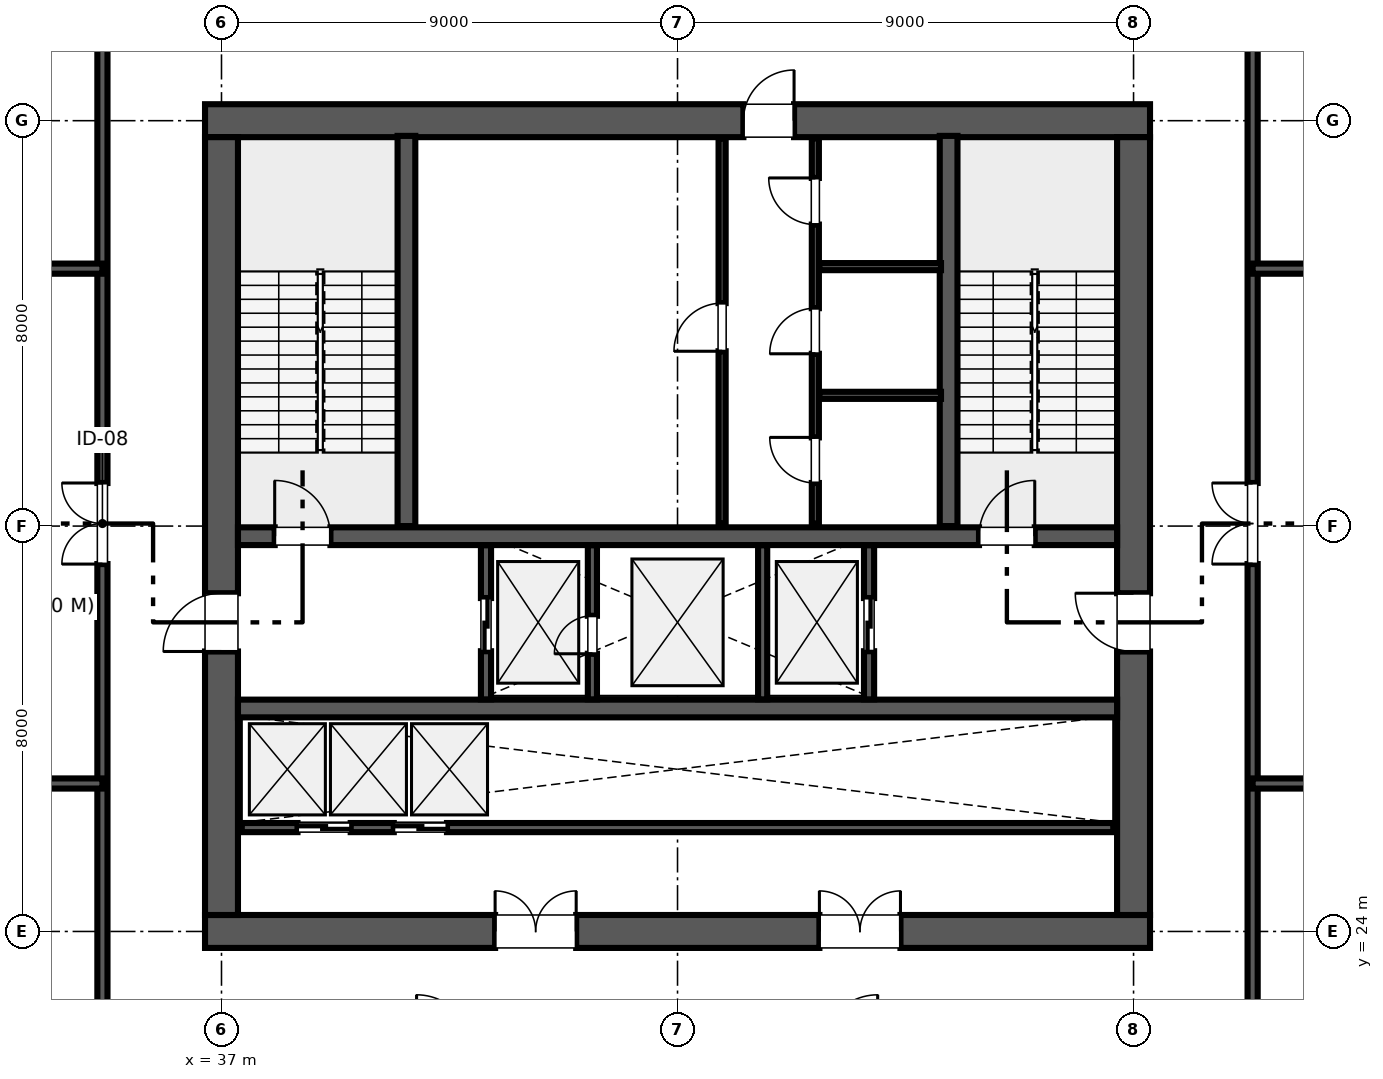
"""IFC4 building model, lengths in metres.
Left out: names, types, materials, properties, quantities, classifications, styles, units other than length and angle.
Written with IfcOpenShell. Run it as: python <this file> out.ifc"""

import sys

from ifc_helpers import new_model, si_unit, direction, frame, frame_2d, origin, place, context, subcontext, project, spatial, rectangle, extrude, element, fill, save


model = new_model("IFC4")
c1 = context("Model", 3, precision=1e-05, world=origin(), true_north=direction((0.0, 1.0)))
c2 = subcontext(c1, "Body", "Model", "MODEL_VIEW")
j1 = project(units=[si_unit("LENGTHUNIT", "METRE"), si_unit("PLANEANGLEUNIT", "RADIAN")], contexts=[c1])
p1 = place(None, origin())
s1 = spatial("IfcSite", under=j1, at=p1, CompositionType="ELEMENT")
p2 = place(p1, origin())
s2 = spatial("IfcBuilding", under=s1, at=p2, CompositionType="ELEMENT")
p3 = place(p2, frame((0.0, 0.0, 85.6)))
s3 = spatial("IfcBuildingStorey", under=s2, at=p3, CompositionType="ELEMENT", Elevation=85.6)
p4 = place(p3, frame((36.675, 24.0, 0.0), z_axis=(0.0, 0.0, 1.0), x_axis=(1.0, 0.0, 0.0)))
e1 = element("IfcWall", 1, at=p4, inside=s3, PredefinedType="SHEAR", context=c2, shape_type="SweptSolid", body=[
    extrude(rectangle(XDim=18.65, YDim=0.65, at=frame_2d((9.325, 0.0))), origin(), (0.0, 0.0, 1.0), 4.48),
])
p5 = place(p4, frame((5.725, 0.0, 0.0)))
e2 = element("IfcOpeningElement", 2, at=p5, cuts=e1, PredefinedType="OPENING", context=c2, shape_type="SweptSolid", body=[
    extrude(rectangle(XDim=1.6, YDim=2.15, at=frame_2d((0.8, 1.075))), frame((0.0, 0.335, 0.0), z_axis=(0.0, -1.0, 0.0), x_axis=(1.0, 0.0, 0.0)), (0.0, 0.0, 1.0), 0.67),
])
p6 = place(p4, frame((12.125, 0.0, 0.0)))
e3 = element("IfcOpeningElement", 3, at=p6, cuts=e1, PredefinedType="OPENING", context=c2, shape_type="SweptSolid", body=[
    extrude(rectangle(XDim=1.6, YDim=2.15, at=frame_2d((0.8, 1.075))), frame((0.0, 0.335, 0.0), z_axis=(0.0, -1.0, 0.0), x_axis=(1.0, 0.0, 0.0)), (0.0, 0.0, 1.0), 0.67),
])
p7 = place(p3, frame((36.675, 40.0, 0.0), z_axis=(0.0, 0.0, 1.0), x_axis=(1.0, 0.0, 0.0)))
e4 = element("IfcWall", 4, at=p7, inside=s3, PredefinedType="SHEAR", context=c2, shape_type="SweptSolid", body=[
    extrude(rectangle(XDim=18.65, YDim=0.65, at=frame_2d((9.325, 0.0))), origin(), (0.0, 0.0, 1.0), 4.48),
])
p8 = place(p7, frame((10.625, 0.0, 0.0)))
e5 = element("IfcOpeningElement", 5, at=p8, cuts=e4, PredefinedType="OPENING", context=c2, shape_type="SweptSolid", body=[
    extrude(rectangle(XDim=1.0, YDim=2.15, at=frame_2d((0.5, 1.075))), frame((0.0, 0.335, 0.0), z_axis=(0.0, -1.0, 0.0), x_axis=(1.0, 0.0, 0.0)), (0.0, 0.0, 1.0), 0.67),
])
p9 = place(p3, frame((37.0, 24.325, 0.0), z_axis=(0.0, 0.0, 1.0), x_axis=(0.0, 1.0, 0.0)))
e6 = element("IfcWall", 6, at=p9, inside=s3, PredefinedType="SHEAR", context=c2, shape_type="SweptSolid", body=[
    extrude(rectangle(XDim=15.35, YDim=0.65, at=frame_2d((7.675, 0.0))), origin(), (0.0, 0.0, 1.0), 4.48),
])
p10 = place(p9, frame((5.2, 0.0, 0.0)))
e7 = element("IfcOpeningElement", 7, at=p10, cuts=e6, PredefinedType="OPENING", context=c2, shape_type="SweptSolid", body=[
    extrude(rectangle(XDim=1.15, YDim=2.15, at=frame_2d((0.575, 1.075))), frame((0.0, 0.335, 0.0), z_axis=(0.0, -1.0, 0.0), x_axis=(1.0, 0.0, 0.0)), (0.0, 0.0, 1.0), 0.67),
])
p11 = place(p3, frame((55.0, 24.325, 0.0), z_axis=(0.0, 0.0, 1.0), x_axis=(0.0, 1.0, 0.0)))
e8 = element("IfcWall", 8, at=p11, inside=s3, PredefinedType="SHEAR", context=c2, shape_type="SweptSolid", body=[
    extrude(rectangle(XDim=15.35, YDim=0.65, at=frame_2d((7.675, 0.0))), origin(), (0.0, 0.0, 1.0), 4.48),
])
p12 = place(p11, frame((5.2, 0.0, 0.0)))
e9 = element("IfcOpeningElement", 9, at=p12, cuts=e8, PredefinedType="OPENING", context=c2, shape_type="SweptSolid", body=[
    extrude(rectangle(XDim=1.15, YDim=2.15, at=frame_2d((0.575, 1.075))), frame((0.0, 0.335, 0.0), z_axis=(0.0, -1.0, 0.0), x_axis=(1.0, 0.0, 0.0)), (0.0, 0.0, 1.0), 0.67),
])
p13 = place(p3, frame((37.325, 31.8, 0.0), z_axis=(0.0, 0.0, 1.0), x_axis=(1.0, 0.0, 0.0)))
e10 = element("IfcWall", 10, at=p13, inside=s3, PredefinedType="SHEAR", context=c2, shape_type="SweptSolid", body=[
    extrude(rectangle(XDim=17.35, YDim=0.35, at=frame_2d((8.675, 0.0))), origin(), (0.0, 0.0, 1.0), 4.48),
])
p14 = place(p13, frame((0.725, 0.0, 0.0)))
e11 = element("IfcOpeningElement", 11, at=p14, cuts=e10, PredefinedType="OPENING", context=c2, shape_type="SweptSolid", body=[
    extrude(rectangle(XDim=1.1, YDim=2.15, at=frame_2d((0.55, 1.075))), frame((0.0, 0.185, 0.0), z_axis=(0.0, -1.0, 0.0), x_axis=(1.0, 0.0, 0.0)), (0.0, 0.0, 1.0), 0.37),
])
p15 = place(p13, frame((14.625, 0.0, 0.0)))
e12 = element("IfcOpeningElement", 12, at=p15, cuts=e10, PredefinedType="OPENING", context=c2, shape_type="SweptSolid", body=[
    extrude(rectangle(XDim=1.1, YDim=2.15, at=frame_2d((0.55, 1.075))), frame((0.0, 0.185, 0.0), z_axis=(0.0, -1.0, 0.0), x_axis=(1.0, 0.0, 0.0)), (0.0, 0.0, 1.0), 0.37),
])
p16 = place(p3, frame((37.325, 28.4, 0.0), z_axis=(0.0, 0.0, 1.0), x_axis=(1.0, 0.0, 0.0)))
e13 = element("IfcWall", 13, at=p16, inside=s3, PredefinedType="SHEAR", context=c2, shape_type="SweptSolid", body=[
    extrude(rectangle(XDim=17.35, YDim=0.35, at=frame_2d((8.675, 0.0))), origin(), (0.0, 0.0, 1.0), 4.48),
])
for number, where, z_axis, x_axis in (
    (14, (40.65, 32.0, 0.0), (0.0, 0.0, 1.0), (0.0, 1.0, 0.0)),
    (15, (51.35, 32.0, 0.0), (0.0, 0.0, 1.0), (0.0, 1.0, 0.0)),
):
    element("IfcWall", number, at=place(p3, frame(where, z_axis=z_axis, x_axis=x_axis)), inside=s3, PredefinedType="SHEAR", context=c2, shape_type="SweptSolid", body=[
        extrude(rectangle(XDim=7.7, YDim=0.35, at=frame_2d((3.85, 0.0))), origin(), (0.0, 0.0, 1.0), 4.8),
    ])
p17 = place(p3, frame((46.88, 32.05, 0.0), z_axis=(0.0, 0.0, 1.0), x_axis=(0.0, 1.0, 0.0)))
e16 = element("IfcWall", 16, at=p17, inside=s3, PredefinedType="PARTITIONING", context=c2, shape_type="SweptSolid", body=[
    extrude(rectangle(XDim=7.6, YDim=0.14, at=frame_2d((3.8, 0.0))), origin(), (0.0, 0.0, 1.0), 4.48),
])
p18 = place(p17, frame((3.4, 0.0, 0.0)))
e17 = element("IfcOpeningElement", 17, at=p18, cuts=e16, PredefinedType="OPENING", context=c2, shape_type="SweptSolid", body=[
    extrude(rectangle(XDim=0.95, YDim=2.15, at=frame_2d((0.475, 1.075))), frame((0.0, 0.08, 0.0), z_axis=(0.0, -1.0, 0.0), x_axis=(1.0, 0.0, 0.0)), (0.0, 0.0, 1.0), 0.16),
])
p19 = place(p3, frame((48.72, 32.05, 0.0), z_axis=(0.0, 0.0, 1.0), x_axis=(0.0, 1.0, 0.0)))
e18 = element("IfcWall", 18, at=p19, inside=s3, PredefinedType="PARTITIONING", context=c2, shape_type="SweptSolid", body=[
    extrude(rectangle(XDim=7.6, YDim=0.14, at=frame_2d((3.8, 0.0))), origin(), (0.0, 0.0, 1.0), 4.48),
])
p20 = place(p19, frame((0.8, 0.0, 0.0)))
e19 = element("IfcOpeningElement", 19, at=p20, cuts=e18, PredefinedType="OPENING", context=c2, shape_type="SweptSolid", body=[
    extrude(rectangle(XDim=0.9, YDim=2.15, at=frame_2d((0.45, 1.075))), frame((0.0, 0.08, 0.0), z_axis=(0.0, -1.0, 0.0), x_axis=(1.0, 0.0, 0.0)), (0.0, 0.0, 1.0), 0.16),
])
p21 = place(p19, frame((3.35, 0.0, 0.0)))
e20 = element("IfcOpeningElement", 20, at=p21, cuts=e18, PredefinedType="OPENING", context=c2, shape_type="SweptSolid", body=[
    extrude(rectangle(XDim=0.9, YDim=2.15, at=frame_2d((0.45, 1.075))), frame((0.0, 0.08, 0.0), z_axis=(0.0, -1.0, 0.0), x_axis=(1.0, 0.0, 0.0)), (0.0, 0.0, 1.0), 0.16),
])
p22 = place(p19, frame((5.9, 0.0, 0.0)))
e21 = element("IfcOpeningElement", 21, at=p22, cuts=e18, PredefinedType="OPENING", context=c2, shape_type="SweptSolid", body=[
    extrude(rectangle(XDim=0.92, YDim=2.15, at=frame_2d((0.46, 1.075))), frame((0.0, 0.08, 0.0), z_axis=(0.0, -1.0, 0.0), x_axis=(1.0, 0.0, 0.0)), (0.0, 0.0, 1.0), 0.16),
])
for number, where, z_axis, x_axis in (
    (22, (48.8, 34.58, 0.0), (0.0, 0.0, 1.0), (1.0, 0.0, 0.0)),
    (23, (48.8, 37.12, 0.0), (0.0, 0.0, 1.0), (1.0, 0.0, 0.0)),
):
    element("IfcWall", number, at=place(p3, frame(where, z_axis=z_axis, x_axis=x_axis)), inside=s3, PredefinedType="PARTITIONING", context=c2, shape_type="SweptSolid", body=[
        extrude(rectangle(XDim=2.4, YDim=0.14, at=frame_2d((1.2, 0.0))), origin(), (0.0, 0.0, 1.0), 4.48),
    ])
p23 = place(p3, frame((42.22, 28.58, 0.0), z_axis=(0.0, 0.0, 1.0), x_axis=(0.0, 1.0, 0.0)))
e24 = element("IfcWall", 24, at=p23, inside=s3, PredefinedType="PARTITIONING", context=c2, shape_type="SweptSolid", body=[
    extrude(rectangle(XDim=3.04, YDim=0.2, at=frame_2d((1.52, 0.0))), origin(), (0.0, 0.0, 1.0), 4.48),
])
p24 = place(p23, frame((0.95, 0.0, 0.0)))
e25 = element("IfcOpeningElement", 25, at=p24, cuts=e24, PredefinedType="OPENING", context=c2, shape_type="SweptSolid", body=[
    extrude(rectangle(XDim=1.05, YDim=2.15, at=frame_2d((0.525, 1.075))), frame((0.0, 0.11, 0.0), z_axis=(0.0, -1.0, 0.0), x_axis=(1.0, 0.0, 0.0)), (0.0, 0.0, 1.0), 0.22),
])
p25 = place(p3, frame((49.78, 28.58, 0.0), z_axis=(0.0, 0.0, 1.0), x_axis=(0.0, 1.0, 0.0)))
e26 = element("IfcWall", 26, at=p25, inside=s3, PredefinedType="PARTITIONING", context=c2, shape_type="SweptSolid", body=[
    extrude(rectangle(XDim=3.04, YDim=0.2, at=frame_2d((1.52, 0.0))), origin(), (0.0, 0.0, 1.0), 4.48),
])
p26 = place(p25, frame((0.95, 0.0, 0.0)))
e27 = element("IfcOpeningElement", 27, at=p26, cuts=e26, PredefinedType="OPENING", context=c2, shape_type="SweptSolid", body=[
    extrude(rectangle(XDim=1.05, YDim=2.15, at=frame_2d((0.525, 1.075))), frame((0.0, 0.11, 0.0), z_axis=(0.0, -1.0, 0.0), x_axis=(1.0, 0.0, 0.0)), (0.0, 0.0, 1.0), 0.22),
])
p27 = place(p3, frame((44.32, 28.58, 0.0), z_axis=(0.0, 0.0, 1.0), x_axis=(0.0, 1.0, 0.0)))
e28 = element("IfcWall", 28, at=p27, inside=s3, PredefinedType="PARTITIONING", context=c2, shape_type="SweptSolid", body=[
    extrude(rectangle(XDim=3.04, YDim=0.18, at=frame_2d((1.52, 0.0))), origin(), (0.0, 0.0, 1.0), 4.48),
])
p28 = place(p27, frame((0.9, 0.0, 0.0)))
e29 = element("IfcOpeningElement", 29, at=p28, cuts=e28, PredefinedType="OPENING", context=c2, shape_type="SweptSolid", body=[
    extrude(rectangle(XDim=0.75, YDim=2.0, at=frame_2d((0.375, 1.0))), frame((0.0, 0.1, 0.0), z_axis=(0.0, -1.0, 0.0), x_axis=(1.0, 0.0, 0.0)), (0.0, 0.0, 1.0), 0.2),
])
p29 = place(p3, frame((47.68, 28.58, 0.0), z_axis=(0.0, 0.0, 1.0), x_axis=(0.0, 1.0, 0.0)))
e30 = element("IfcWall", 30, at=p29, inside=s3, PredefinedType="PARTITIONING", context=c2, shape_type="SweptSolid", body=[
    extrude(rectangle(XDim=3.04, YDim=0.18, at=frame_2d((1.52, 0.0))), origin(), (0.0, 0.0, 1.0), 4.48),
])
p30 = place(p3, frame((37.4, 26.05, 0.0), z_axis=(0.0, 0.0, 1.0), x_axis=(1.0, 0.0, 0.0)))
e31 = element("IfcWall", 31, at=p30, inside=s3, PredefinedType="PARTITIONING", context=c2, shape_type="SweptSolid", body=[
    extrude(rectangle(XDim=17.2, YDim=0.18, at=frame_2d((8.6, 0.0))), origin(), (0.0, 0.0, 1.0), 4.48),
])
p31 = place(p30, frame((1.1, 0.0, 0.0)))
e32 = element("IfcOpeningElement", 32, at=p31, cuts=e31, PredefinedType="OPENING", context=c2, shape_type="SweptSolid", body=[
    extrude(rectangle(XDim=1.05, YDim=2.15, at=frame_2d((0.525, 1.075))), frame((0.0, 0.1, 0.0), z_axis=(0.0, -1.0, 0.0), x_axis=(1.0, 0.0, 0.0)), (0.0, 0.0, 1.0), 0.2),
])
p32 = place(p30, frame((3.0, 0.0, 0.0)))
e33 = element("IfcOpeningElement", 33, at=p32, cuts=e31, PredefinedType="OPENING", context=c2, shape_type="SweptSolid", body=[
    extrude(rectangle(XDim=1.05, YDim=2.15, at=frame_2d((0.525, 1.075))), frame((0.0, 0.1, 0.0), z_axis=(0.0, -1.0, 0.0), x_axis=(1.0, 0.0, 0.0)), (0.0, 0.0, 1.0), 0.2),
])
p33 = place(p3, frame((34.65, 21.65, 0.0), z_axis=(0.0, 0.0, 1.0), x_axis=(0.0, 1.0, 0.0)))
e34 = element("IfcWall", 34, at=p33, inside=s3, PredefinedType="PARTITIONING", context=c2, shape_type="SweptSolid", body=[
    extrude(rectangle(XDim=20.7, YDim=0.2, at=frame_2d((10.35, 0.0))), origin(), (0.0, 0.0, 1.0), 3.41),
])
p34 = place(p33, frame((9.6, 0.0, 0.0)))
e35 = element("IfcOpeningElement", 35, at=p34, cuts=e34, PredefinedType="OPENING", context=c2, shape_type="SweptSolid", body=[
    extrude(rectangle(XDim=1.6, YDim=2.15, at=frame_2d((0.8, 1.075))), frame((0.0, 0.11, 0.0), z_axis=(0.0, -1.0, 0.0), x_axis=(1.0, 0.0, 0.0)), (0.0, 0.0, 1.0), 0.22),
])
p35 = place(p3, frame((57.35, 21.65, 0.0), z_axis=(0.0, 0.0, 1.0), x_axis=(0.0, 1.0, 0.0)))
e36 = element("IfcWall", 36, at=p35, inside=s3, PredefinedType="PARTITIONING", context=c2, shape_type="SweptSolid", body=[
    extrude(rectangle(XDim=20.7, YDim=0.2, at=frame_2d((10.35, 0.0))), origin(), (0.0, 0.0, 1.0), 3.41),
])
p36 = place(p35, frame((9.6, 0.0, 0.0)))
e37 = element("IfcOpeningElement", 37, at=p36, cuts=e36, PredefinedType="OPENING", context=c2, shape_type="SweptSolid", body=[
    extrude(rectangle(XDim=1.6, YDim=2.15, at=frame_2d((0.8, 1.075))), frame((0.0, 0.11, 0.0), z_axis=(0.0, -1.0, 0.0), x_axis=(1.0, 0.0, 0.0)), (0.0, 0.0, 1.0), 0.22),
])
for number, where, z_axis, x_axis in (
    (38, (22.047, 26.92, 0.0), (0.0, 0.0, 1.0), (1.0, 0.0, 0.0)),
    (39, (22.047, 37.08, 0.0), (0.0, 0.0, 1.0), (1.0, 0.0, 0.0)),
    (40, (57.35, 26.92, 0.0), (0.0, 0.0, 1.0), (1.0, 0.0, 0.0)),
    (41, (57.35, 37.08, 0.0), (0.0, 0.0, 1.0), (1.0, 0.0, 0.0)),
):
    element("IfcWall", number, at=place(p3, frame(where, z_axis=z_axis, x_axis=x_axis)), inside=s3, PredefinedType="PARTITIONING", context=c2, shape_type="SweptSolid", body=[
        extrude(rectangle(XDim=12.603, YDim=0.2, at=frame_2d((6.302, 0.0))), origin(), (0.0, 0.0, 1.0), 3.41),
    ])
p37 = place(p14, origin())
e42 = element("IfcDoor", 42, at=p37, inside=s3, OperationType="SINGLE_SWING_LEFT", PredefinedType="DOOR", context=c2, shape_type="SweptSolid", body=[
    extrude(rectangle(XDim=1.1, YDim=2.15, at=frame_2d((0.55, 1.075))), frame((0.0, 0.025, 0.0), z_axis=(0.0, -1.0, 0.0), x_axis=(1.0, 0.0, 0.0)), (0.0, 0.0, 1.0), 0.05),
])
fill(e11, e42)
p38 = place(p15, origin())
e43 = element("IfcDoor", 43, at=p38, inside=s3, OperationType="SINGLE_SWING_RIGHT", PredefinedType="DOOR", context=c2, shape_type="SweptSolid", body=[
    extrude(rectangle(XDim=1.1, YDim=2.15, at=frame_2d((0.55, 1.075))), frame((0.0, 0.025, 0.0), z_axis=(0.0, -1.0, 0.0), x_axis=(1.0, 0.0, 0.0)), (0.0, 0.0, 1.0), 0.05),
])
fill(e12, e43)
p39 = place(p8, origin())
e44 = element("IfcDoor", 44, at=p39, inside=s3, OperationType="SINGLE_SWING_RIGHT", PredefinedType="DOOR", context=c2, shape_type="SweptSolid", body=[
    extrude(rectangle(XDim=1.0, YDim=2.15, at=frame_2d((0.5, 1.075))), frame((0.0, 0.025, 0.0), z_axis=(0.0, -1.0, 0.0), x_axis=(1.0, 0.0, 0.0)), (0.0, 0.0, 1.0), 0.05),
])
fill(e5, e44)
p40 = place(p10, origin())
e45 = element("IfcDoor", 45, at=p40, inside=s3, OperationType="SINGLE_SWING_LEFT", PredefinedType="DOOR", context=c2, shape_type="SweptSolid", body=[
    extrude(rectangle(XDim=1.15, YDim=2.15, at=frame_2d((0.575, 1.075))), frame((0.0, 0.025, 0.0), z_axis=(0.0, -1.0, 0.0), x_axis=(1.0, 0.0, 0.0)), (0.0, 0.0, 1.0), 0.05),
])
fill(e7, e45)
p41 = place(p12, origin())
e46 = element("IfcDoor", 46, at=p41, inside=s3, OperationType="SINGLE_SWING_RIGHT", PredefinedType="DOOR", context=c2, shape_type="SweptSolid", body=[
    extrude(rectangle(XDim=1.15, YDim=2.15, at=frame_2d((0.575, 1.075))), frame((0.0, 0.025, 0.0), z_axis=(0.0, -1.0, 0.0), x_axis=(1.0, 0.0, 0.0)), (0.0, 0.0, 1.0), 0.05),
])
fill(e9, e46)
p42 = place(p5, origin())
e47 = element("IfcDoor", 47, at=p42, inside=s3, OperationType="DOUBLE_DOOR_SINGLE_SWING", PredefinedType="DOOR", context=c2, shape_type="SweptSolid", body=[
    extrude(rectangle(XDim=1.6, YDim=2.15, at=frame_2d((0.8, 1.075))), frame((0.0, 0.025, 0.0), z_axis=(0.0, -1.0, 0.0), x_axis=(1.0, 0.0, 0.0)), (0.0, 0.0, 1.0), 0.05),
])
fill(e2, e47)
p43 = place(p6, origin())
e48 = element("IfcDoor", 48, at=p43, inside=s3, OperationType="DOUBLE_DOOR_SINGLE_SWING", PredefinedType="DOOR", context=c2, shape_type="SweptSolid", body=[
    extrude(rectangle(XDim=1.6, YDim=2.15, at=frame_2d((0.8, 1.075))), frame((0.0, 0.025, 0.0), z_axis=(0.0, -1.0, 0.0), x_axis=(1.0, 0.0, 0.0)), (0.0, 0.0, 1.0), 0.05),
])
fill(e3, e48)
p44 = place(p18, origin())
e49 = element("IfcDoor", 49, at=p44, inside=s3, OperationType="SINGLE_SWING_LEFT", PredefinedType="DOOR", context=c2, shape_type="SweptSolid", body=[
    extrude(rectangle(XDim=0.95, YDim=2.15, at=frame_2d((0.475, 1.075))), frame((0.0, 0.025, 0.0), z_axis=(0.0, -1.0, 0.0), x_axis=(1.0, 0.0, 0.0)), (0.0, 0.0, 1.0), 0.05),
])
fill(e17, e49)
p45 = place(p20, origin())
e50 = element("IfcDoor", 50, at=p45, inside=s3, OperationType="SINGLE_SWING_RIGHT", PredefinedType="DOOR", context=c2, shape_type="SweptSolid", body=[
    extrude(rectangle(XDim=0.9, YDim=2.15, at=frame_2d((0.45, 1.075))), frame((0.0, 0.025, 0.0), z_axis=(0.0, -1.0, 0.0), x_axis=(1.0, 0.0, 0.0)), (0.0, 0.0, 1.0), 0.05),
])
fill(e19, e50)
p46 = place(p21, origin())
e51 = element("IfcDoor", 51, at=p46, inside=s3, OperationType="SINGLE_SWING_LEFT", PredefinedType="DOOR", context=c2, shape_type="SweptSolid", body=[
    extrude(rectangle(XDim=0.9, YDim=2.15, at=frame_2d((0.45, 1.075))), frame((0.0, 0.025, 0.0), z_axis=(0.0, -1.0, 0.0), x_axis=(1.0, 0.0, 0.0)), (0.0, 0.0, 1.0), 0.05),
])
fill(e20, e51)
p47 = place(p22, origin())
e52 = element("IfcDoor", 52, at=p47, inside=s3, OperationType="SINGLE_SWING_RIGHT", PredefinedType="DOOR", context=c2, shape_type="SweptSolid", body=[
    extrude(rectangle(XDim=0.92, YDim=2.15, at=frame_2d((0.46, 1.075))), frame((0.0, 0.025, 0.0), z_axis=(0.0, -1.0, 0.0), x_axis=(1.0, 0.0, 0.0)), (0.0, 0.0, 1.0), 0.05),
])
fill(e21, e52)
p48 = place(p24, origin())
e53 = element("IfcDoor", 53, at=p48, inside=s3, OperationType="SLIDING_TO_LEFT", PredefinedType="DOOR", context=c2, shape_type="SweptSolid", body=[
    extrude(rectangle(XDim=1.05, YDim=2.15, at=frame_2d((0.525, 1.075))), frame((0.0, 0.025, 0.0), z_axis=(0.0, -1.0, 0.0), x_axis=(1.0, 0.0, 0.0)), (0.0, 0.0, 1.0), 0.05),
])
fill(e25, e53)
p49 = place(p26, origin())
e54 = element("IfcDoor", 54, at=p49, inside=s3, OperationType="SLIDING_TO_RIGHT", PredefinedType="DOOR", context=c2, shape_type="SweptSolid", body=[
    extrude(rectangle(XDim=1.05, YDim=2.15, at=frame_2d((0.525, 1.075))), frame((0.0, 0.025, 0.0), z_axis=(0.0, -1.0, 0.0), x_axis=(1.0, 0.0, 0.0)), (0.0, 0.0, 1.0), 0.05),
])
fill(e27, e54)
p50 = place(p31, origin())
e55 = element("IfcDoor", 55, at=p50, inside=s3, OperationType="SLIDING_TO_LEFT", PredefinedType="DOOR", context=c2, shape_type="SweptSolid", body=[
    extrude(rectangle(XDim=1.05, YDim=2.15, at=frame_2d((0.525, 1.075))), frame((0.0, 0.025, 0.0), z_axis=(0.0, -1.0, 0.0), x_axis=(1.0, 0.0, 0.0)), (0.0, 0.0, 1.0), 0.05),
])
fill(e32, e55)
p51 = place(p32, origin())
e56 = element("IfcDoor", 56, at=p51, inside=s3, OperationType="SLIDING_TO_RIGHT", PredefinedType="DOOR", context=c2, shape_type="SweptSolid", body=[
    extrude(rectangle(XDim=1.05, YDim=2.15, at=frame_2d((0.525, 1.075))), frame((0.0, 0.025, 0.0), z_axis=(0.0, -1.0, 0.0), x_axis=(1.0, 0.0, 0.0)), (0.0, 0.0, 1.0), 0.05),
])
fill(e33, e56)
p52 = place(p34, origin())
e57 = element("IfcDoor", 57, at=p52, inside=s3, OperationType="DOUBLE_DOOR_SINGLE_SWING", PredefinedType="DOOR", context=c2, shape_type="SweptSolid", body=[
    extrude(rectangle(XDim=1.6, YDim=2.15, at=frame_2d((0.8, 1.075))), frame((0.0, 0.025, 0.0), z_axis=(0.0, -1.0, 0.0), x_axis=(1.0, 0.0, 0.0)), (0.0, 0.0, 1.0), 0.05),
])
fill(e35, e57)
p53 = place(p36, origin())
e58 = element("IfcDoor", 58, at=p53, inside=s3, OperationType="DOUBLE_DOOR_SINGLE_SWING", PredefinedType="DOOR", context=c2, shape_type="SweptSolid", body=[
    extrude(rectangle(XDim=1.6, YDim=2.15, at=frame_2d((0.8, 1.075))), frame((0.0, 0.025, 0.0), z_axis=(0.0, -1.0, 0.0), x_axis=(1.0, 0.0, 0.0)), (0.0, 0.0, 1.0), 0.05),
])
fill(e37, e58)
p54 = place(p28, origin())
e59 = element("IfcDoor", 59, at=p54, inside=s3, OperationType="SINGLE_SWING_LEFT", PredefinedType="TRAPDOOR", context=c2, shape_type="SweptSolid", body=[
    extrude(rectangle(XDim=0.75, YDim=2.0, at=frame_2d((0.375, 1.0))), frame((0.0, 0.025, 0.0), z_axis=(0.0, -1.0, 0.0), x_axis=(1.0, 0.0, 0.0)), (0.0, 0.0, 1.0), 0.05),
])
fill(e29, e59)
save(model, sys.argv[1])
